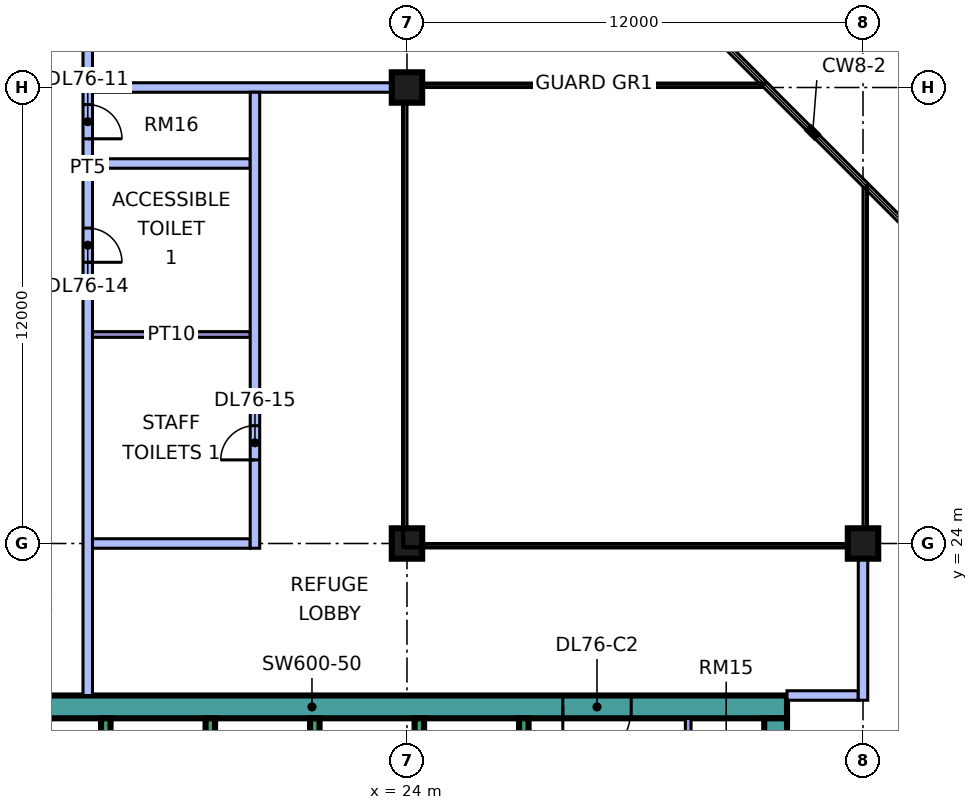
"""IFC4 building model, lengths in metres.
Left out: names, types, materials, properties, quantities, classifications, styles, units other than length and angle.
Written with IfcOpenShell. Run it as: python <this file> out.ifc"""

import sys

from ifc_helpers import new_model, si_unit, direction, frame, frame_2d, origin, origin_2d, place, context, subcontext, project, spatial, rectangle, extrude, element, fill, save


model = new_model("IFC4")
c1 = context("Model", 3, precision=1e-05, world=origin(), true_north=direction((0.0, 1.0)))
c2 = subcontext(c1, "Body", "Model", "MODEL_VIEW")
j1 = project(units=[si_unit("LENGTHUNIT", "METRE"), si_unit("PLANEANGLEUNIT", "RADIAN")], contexts=[c1])
p1 = place(None, origin())
s1 = spatial("IfcSite", under=j1, at=p1, CompositionType="ELEMENT")
p2 = place(p1, origin())
s2 = spatial("IfcBuilding", under=s1, at=p2, CompositionType="ELEMENT")
p3 = place(p2, frame((0.0, 0.0, 322.15)))
s3 = spatial("IfcBuildingStorey", under=s2, at=p3, CompositionType="ELEMENT", Elevation=322.15)
for number, where, z_axis, x_axis in (
    (1, (24.0, 24.0, 0.0), (0.0, 0.0, 1.0), (1.0, 0.0, 0.0)),
    (2, (24.0, 36.0, 0.0), (0.0, 0.0, 1.0), (1.0, 0.0, 0.0)),
    (3, (36.0, 24.0, 0.0), (0.0, 0.0, 1.0), (1.0, 0.0, 0.0)),
):
    element("IfcColumn", number, at=place(p3, frame(where, z_axis=z_axis, x_axis=x_axis)), inside=s3, PredefinedType="COLUMN", context=c2, shape_type="SweptSolid", body=[
        extrude(rectangle(XDim=0.8, YDim=0.8, at=origin_2d()), origin(), (0.0, 0.0, 1.0), 5.5),
    ])
p4 = place(p3, frame((9.0, 19.7, 0.0), z_axis=(0.0, 0.0, 1.0), x_axis=(1.0, 0.0, 0.0)))
e4 = element("IfcWall", 4, at=p4, inside=s3, PredefinedType="SHEAR", context=c2, shape_type="SweptSolid", body=[
    extrude(rectangle(XDim=25.0, YDim=0.6, at=frame_2d((12.5, 0.0))), origin(), (0.0, 0.0, 1.0), 5.5),
])
p5 = place(p4, frame((19.1, 0.0, 0.0)))
e5 = element("IfcOpeningElement", 5, at=p5, cuts=e4, PredefinedType="OPENING", context=c2, shape_type="SweptSolid", body=[
    extrude(rectangle(XDim=1.8, YDim=2.4, at=frame_2d((0.9, 1.2))), frame((0.0, 0.31, 0.0), z_axis=(0.0, -1.0, 0.0), x_axis=(1.0, 0.0, 0.0)), (0.0, 0.0, 1.0), 0.62),
])
p6 = place(p3, frame((33.7, 7.6, 0.0), z_axis=(0.0, 0.0, 1.0), x_axis=(0.0, 1.0, 0.0)))
e6 = element("IfcWall", 6, at=p6, inside=s3, PredefinedType="SHEAR", context=c2, shape_type="SweptSolid", body=[
    extrude(rectangle(XDim=11.8, YDim=0.6, at=frame_2d((5.9, 0.0))), origin(), (0.0, 0.0, 1.0), 5.5),
])
p7 = place(p6, frame((5.6, 0.0, 0.0)))
e7 = element("IfcOpeningElement", 7, at=p7, cuts=e6, PredefinedType="OPENING", context=c2, shape_type="SweptSolid", body=[
    extrude(rectangle(XDim=1.8, YDim=2.4, at=frame_2d((0.9, 1.2))), frame((0.0, 0.31, 0.0), z_axis=(0.0, -1.0, 0.0), x_axis=(1.0, 0.0, 0.0)), (0.0, 0.0, 1.0), 0.62),
])
for number, where, z_axis, x_axis in (
    (8, (16.075, 15.8, 0.0), (0.0, 0.0, 1.0), (0.0, 1.0, 0.0)),
    (9, (18.825, 15.8, 0.0), (0.0, 0.0, 1.0), (0.0, 1.0, 0.0)),
    (10, (21.575, 15.8, 0.0), (0.0, 0.0, 1.0), (0.0, 1.0, 0.0)),
    (11, (24.325, 15.8, 0.0), (0.0, 0.0, 1.0), (0.0, 1.0, 0.0)),
    (12, (27.075, 15.8, 0.0), (0.0, 0.0, 1.0), (0.0, 1.0, 0.0)),
):
    element("IfcWall", number, at=place(p3, frame(where, z_axis=z_axis, x_axis=x_axis)), inside=s3, PredefinedType="SHEAR", context=c2, shape_type="SweptSolid", body=[
        extrude(rectangle(XDim=3.6, YDim=0.25, at=frame_2d((1.8, 0.0))), origin(), (0.0, 0.0, 1.0), 5.5),
    ])
p8 = place(p3, frame((31.4, 16.2, 0.0), z_axis=(0.0, 0.0, 1.0), x_axis=(0.0, 1.0, 0.0)))
e13 = element("IfcWall", 13, at=p8, inside=s3, PredefinedType="PARTITIONING", context=c2, shape_type="SweptSolid", body=[
    extrude(rectangle(XDim=3.2, YDim=0.15, at=frame_2d((1.6, 0.0))), origin(), (0.0, 0.0, 1.0), 5.05),
])
p9 = place(p8, frame((0.5, 0.0, 0.0)))
e14 = element("IfcOpeningElement", 14, at=p9, cuts=e13, PredefinedType="OPENING", context=c2, shape_type="SweptSolid", body=[
    extrude(rectangle(XDim=0.9, YDim=2.1, at=frame_2d((0.45, 1.05))), frame((0.0, 0.085, 0.0), z_axis=(0.0, -1.0, 0.0), x_axis=(1.0, 0.0, 0.0)), (0.0, 0.0, 1.0), 0.17),
])
p10 = place(p3, frame((15.6, 20.0, 0.0), z_axis=(0.0, 0.0, 1.0), x_axis=(0.0, 1.0, 0.0)))
e15 = element("IfcWall", 15, at=p10, inside=s3, PredefinedType="PARTITIONING", context=c2, shape_type="SweptSolid", body=[
    extrude(rectangle(XDim=27.775, YDim=0.25, at=frame_2d((13.887, 0.0))), origin(), (0.0, 0.0, 1.0), 5.05),
])
p11 = place(p10, frame((18.15, 0.0, 0.0)))
e16 = element("IfcOpeningElement", 16, at=p11, cuts=e15, PredefinedType="OPENING", context=c2, shape_type="SweptSolid", body=[
    extrude(rectangle(XDim=1.8, YDim=2.1, at=frame_2d((0.9, 1.05))), frame((0.0, 0.135, 0.0), z_axis=(0.0, -1.0, 0.0), x_axis=(1.0, 0.0, 0.0)), (0.0, 0.0, 1.0), 0.27),
])
p12 = place(p10, frame((24.4, 0.0, 0.0)))
e17 = element("IfcOpeningElement", 17, at=p12, cuts=e15, PredefinedType="OPENING", context=c2, shape_type="SweptSolid", body=[
    extrude(rectangle(XDim=0.9, YDim=2.1, at=frame_2d((0.45, 1.05))), frame((0.0, 0.135, 0.0), z_axis=(0.0, -1.0, 0.0), x_axis=(1.0, 0.0, 0.0)), (0.0, 0.0, 1.0), 0.27),
])
p13 = place(p10, frame((14.65, 0.0, 0.0)))
e18 = element("IfcOpeningElement", 18, at=p13, cuts=e15, PredefinedType="OPENING", context=c2, shape_type="SweptSolid", body=[
    extrude(rectangle(XDim=0.9, YDim=2.1, at=frame_2d((0.45, 1.05))), frame((0.0, 0.135, 0.0), z_axis=(0.0, -1.0, 0.0), x_axis=(1.0, 0.0, 0.0)), (0.0, 0.0, 1.0), 0.27),
])
p14 = place(p10, frame((11.4, 0.0, 0.0)))
e19 = element("IfcOpeningElement", 19, at=p14, cuts=e15, PredefinedType="OPENING", context=c2, shape_type="SweptSolid", body=[
    extrude(rectangle(XDim=0.9, YDim=2.1, at=frame_2d((0.45, 1.05))), frame((0.0, 0.135, 0.0), z_axis=(0.0, -1.0, 0.0), x_axis=(1.0, 0.0, 0.0)), (0.0, 0.0, 1.0), 0.27),
])
p15 = place(p3, frame((15.725, 24.0, 0.0), z_axis=(0.0, 0.0, 1.0), x_axis=(1.0, 0.0, 0.0)))
e20 = element("IfcWall", 20, at=p15, inside=s3, PredefinedType="PARTITIONING", context=c2, shape_type="SweptSolid", body=[
    extrude(rectangle(XDim=4.15, YDim=0.25, at=frame_2d((2.075, 0.0))), origin(), (0.0, 0.0, 1.0), 5.05),
])
p16 = place(p3, frame((15.725, 29.5, 0.0), z_axis=(0.0, 0.0, 1.0), x_axis=(1.0, 0.0, 0.0)))
e21 = element("IfcWall", 21, at=p16, inside=s3, PredefinedType="PARTITIONING", context=c2, shape_type="SweptSolid", body=[
    extrude(rectangle(XDim=4.15, YDim=0.15, at=frame_2d((2.075, 0.0))), origin(), (0.0, 0.0, 1.0), 5.05),
])
p17 = place(p3, frame((15.725, 34.0, 0.0), z_axis=(0.0, 0.0, 1.0), x_axis=(1.0, 0.0, 0.0)))
e22 = element("IfcWall", 22, at=p17, inside=s3, PredefinedType="PARTITIONING", context=c2, shape_type="SweptSolid", body=[
    extrude(rectangle(XDim=4.15, YDim=0.25, at=frame_2d((2.075, 0.0))), origin(), (0.0, 0.0, 1.0), 5.05),
])
p18 = place(p3, frame((15.725, 36.0, 0.0), z_axis=(0.0, 0.0, 1.0), x_axis=(1.0, 0.0, 0.0)))
e23 = element("IfcWall", 23, at=p18, inside=s3, PredefinedType="PARTITIONING", context=c2, shape_type="SweptSolid", body=[
    extrude(rectangle(XDim=8.275, YDim=0.25, at=frame_2d((4.137, 0.0))), origin(), (0.0, 0.0, 1.0), 5.05),
])
p19 = place(p3, frame((20.0, 23.875, 0.0), z_axis=(0.0, 0.0, 1.0), x_axis=(0.0, 1.0, 0.0)))
e24 = element("IfcWall", 24, at=p19, inside=s3, PredefinedType="PARTITIONING", context=c2, shape_type="SweptSolid", body=[
    extrude(rectangle(XDim=12.0, YDim=0.25, at=frame_2d((6.0, 0.0))), origin(), (0.0, 0.0, 1.0), 5.05),
])
p20 = place(p19, frame((2.325, 0.0, 0.0)))
e25 = element("IfcOpeningElement", 25, at=p20, cuts=e24, PredefinedType="OPENING", context=c2, shape_type="SweptSolid", body=[
    extrude(rectangle(XDim=0.9, YDim=2.1, at=frame_2d((0.45, 1.05))), frame((0.0, 0.135, 0.0), z_axis=(0.0, -1.0, 0.0), x_axis=(1.0, 0.0, 0.0)), (0.0, 0.0, 1.0), 0.27),
])
p21 = place(p3, frame((34.0, 20.0, 0.0), z_axis=(0.0, 0.0, 1.0), x_axis=(1.0, 0.0, 0.0)))
e26 = element("IfcWall", 26, at=p21, inside=s3, PredefinedType="PARTITIONING", context=c2, shape_type="SweptSolid", body=[
    extrude(rectangle(XDim=1.875, YDim=0.25, at=frame_2d((0.938, 0.0))), origin(), (0.0, 0.0, 1.0), 5.05),
])
p22 = place(p3, frame((36.0, 19.875, 0.0), z_axis=(0.0, 0.0, 1.0), x_axis=(0.0, 1.0, 0.0)))
e27 = element("IfcWall", 27, at=p22, inside=s3, PredefinedType="PARTITIONING", context=c2, shape_type="SweptSolid", body=[
    extrude(rectangle(XDim=4.125, YDim=0.25, at=frame_2d((2.062, 0.0))), origin(), (0.0, 0.0, 1.0), 5.05),
])
p23 = place(p5, frame((1.8, 0.0, 0.0), z_axis=(0.0, 0.0, 1.0), x_axis=(-1.0, 0.0, 0.0)))
e28 = element("IfcDoor", 28, at=p23, inside=s3, OperationType="DOUBLE_DOOR_SINGLE_SWING", PredefinedType="DOOR", context=c2, shape_type="SweptSolid", body=[
    extrude(rectangle(XDim=1.8, YDim=2.4, at=frame_2d((0.9, 1.2))), frame((0.0, 0.025, 0.0), z_axis=(0.0, -1.0, 0.0), x_axis=(1.0, 0.0, 0.0)), (0.0, 0.0, 1.0), 0.05),
])
fill(e5, e28)
p24 = place(p13, frame((0.9, 0.0, 0.0), z_axis=(0.0, 0.0, 1.0), x_axis=(-1.0, 0.0, 0.0)))
e29 = element("IfcDoor", 29, at=p24, inside=s3, OperationType="SINGLE_SWING_LEFT", PredefinedType="DOOR", context=c2, shape_type="SweptSolid", body=[
    extrude(rectangle(XDim=0.9, YDim=2.1, at=frame_2d((0.45, 1.05))), frame((0.0, 0.025, 0.0), z_axis=(0.0, -1.0, 0.0), x_axis=(1.0, 0.0, 0.0)), (0.0, 0.0, 1.0), 0.05),
])
fill(e18, e29)
p25 = place(p14, frame((0.9, 0.0, 0.0), z_axis=(0.0, 0.0, 1.0), x_axis=(-1.0, 0.0, 0.0)))
e30 = element("IfcDoor", 30, at=p25, inside=s3, OperationType="SINGLE_SWING_LEFT", PredefinedType="DOOR", context=c2, shape_type="SweptSolid", body=[
    extrude(rectangle(XDim=0.9, YDim=2.1, at=frame_2d((0.45, 1.05))), frame((0.0, 0.025, 0.0), z_axis=(0.0, -1.0, 0.0), x_axis=(1.0, 0.0, 0.0)), (0.0, 0.0, 1.0), 0.05),
])
fill(e19, e30)
p26 = place(p20, origin())
e31 = element("IfcDoor", 31, at=p26, inside=s3, OperationType="SINGLE_SWING_LEFT", PredefinedType="DOOR", context=c2, shape_type="SweptSolid", body=[
    extrude(rectangle(XDim=0.9, YDim=2.1, at=frame_2d((0.45, 1.05))), frame((0.0, 0.025, 0.0), z_axis=(0.0, -1.0, 0.0), x_axis=(1.0, 0.0, 0.0)), (0.0, 0.0, 1.0), 0.05),
])
fill(e25, e31)
save(model, sys.argv[1])
